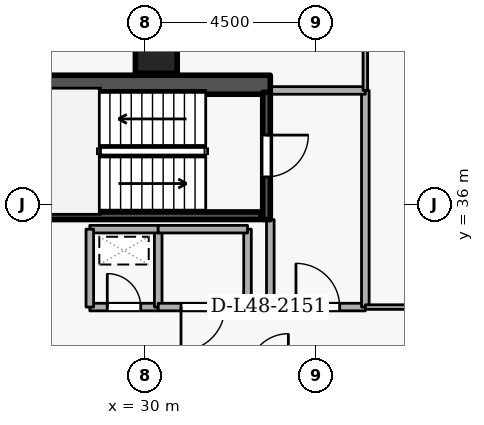
"""IFC4 building model, lengths in metres.
Left out: names, types, materials, properties, quantities, classifications, styles, units other than length and angle.
Written with IfcOpenShell. Run it as: python <this file> out.ifc"""

import sys

from ifc_helpers import new_model, si_unit, direction, frame, frame_2d, origin, origin_2d, place, context, subcontext, project, spatial, rectangle, extrude, element, fill, save


model = new_model("IFC4")
c1 = context("Model", 3, precision=1e-05, world=origin(), true_north=direction((0.0, 1.0)))
c2 = subcontext(c1, "Body", "Model", "MODEL_VIEW")
j1 = project(units=[si_unit("LENGTHUNIT", "METRE"), si_unit("PLANEANGLEUNIT", "RADIAN")], contexts=[c1])
p1 = place(None, origin())
s1 = spatial("IfcSite", under=j1, at=p1, CompositionType="ELEMENT")
p2 = place(p1, origin())
s2 = spatial("IfcBuilding", under=s1, at=p2, CompositionType="ELEMENT")
p3 = place(p2, frame((0.0, 0.0, 182.1)))
s3 = spatial("IfcBuildingStorey", under=s2, at=p3, CompositionType="ELEMENT", Elevation=182.1)
p4 = place(p3, frame((17.7, 39.15, 0.0), z_axis=(0.0, 0.0, 1.0), x_axis=(1.0, 0.0, 0.0)))
e1 = element("IfcWall", 1, at=p4, inside=s3, PredefinedType="SHEAR", context=c2, shape_type="SweptSolid", body=[
    extrude(rectangle(XDim=15.6, YDim=0.5, at=frame_2d((7.8, 0.0))), origin(), (0.0, 0.0, 1.0), 3.6),
])
p5 = place(p3, frame((30.3, 40.0, 0.0), z_axis=(0.0, 0.0, 1.0), x_axis=(1.0, 0.0, 0.0)))
e2 = element("IfcColumn", 2, at=p5, inside=s3, PredefinedType="COLUMN", context=c2, shape_type="SweptSolid", body=[
    extrude(rectangle(XDim=1.1, YDim=1.1, at=origin_2d()), origin(), (0.0, 0.0, 1.0), 3.6),
])
p6 = place(p3, frame((33.2, 38.95, 0.0), z_axis=(0.0, 0.0, 1.0), x_axis=(0.0, -1.0, 0.0)))
e3 = element("IfcWall", 3, at=p6, inside=s3, PredefinedType="SHEAR", context=c2, shape_type="SweptSolid", body=[
    extrude(rectangle(XDim=3.35, YDim=0.2, at=frame_2d((1.675, 0.0))), origin(), (0.0, 0.0, 1.0), 3.6),
])
p7 = place(p6, frame((1.125, 0.0, 0.0)))
e4 = element("IfcOpeningElement", 4, at=p7, cuts=e3, PredefinedType="OPENING", context=c2, shape_type="SweptSolid", body=[
    extrude(rectangle(XDim=1.1, YDim=2.1, at=frame_2d((0.55, 1.05))), frame((0.0, 0.11, 0.0), z_axis=(0.0, -1.0, 0.0), x_axis=(1.0, 0.0, 0.0)), (0.0, 0.0, 1.0), 0.22),
])
p8 = place(p3, frame((25.95, 35.703, 0.0), z_axis=(0.0, 0.0, 1.0), x_axis=(1.0, 0.0, 0.0)))
e5 = element("IfcWall", 5, at=p8, inside=s3, PredefinedType="SHEAR", context=c2, shape_type="SweptSolid", body=[
    extrude(rectangle(XDim=7.1, YDim=0.2, at=frame_2d((3.55, 0.0))), origin(), (0.0, 0.0, 1.0), 3.6),
])
p9 = place(p3, frame((33.3, 33.3, 0.0), z_axis=(0.0, 0.0, 1.0), x_axis=(1.0, 0.0, 0.0)))
e6 = element("IfcWall", 6, at=p9, inside=s3, PredefinedType="STANDARD", context=c2, shape_type="SweptSolid", body=[
    extrude(rectangle(XDim=2.5, YDim=0.2, at=frame_2d((1.25, 0.0))), origin(), (0.0, 0.0, 1.0), 3.34),
])
p10 = place(p9, frame((0.675, 0.0, 0.0)))
e7 = element("IfcOpeningElement", 7, at=p10, cuts=e6, PredefinedType="OPENING", context=c2, shape_type="SweptSolid", body=[
    extrude(rectangle(XDim=1.15, YDim=2.1, at=frame_2d((0.575, 1.05))), frame((0.0, 0.11, 0.0), z_axis=(0.0, -1.0, 0.0), x_axis=(1.0, 0.0, 0.0)), (0.0, 0.0, 1.0), 0.22),
])
p11 = place(p3, frame((35.8, 33.3, 0.0), z_axis=(0.0, 0.0, 1.0), x_axis=(0.0, 1.0, 0.0)))
e8 = element("IfcWall", 8, at=p11, inside=s3, PredefinedType="STANDARD", context=c2, shape_type="SweptSolid", body=[
    extrude(rectangle(XDim=5.7, YDim=0.2, at=frame_2d((2.85, 0.0))), origin(), (0.0, 0.0, 1.0), 3.34),
])
p12 = place(p3, frame((35.8, 39.0, 0.0), z_axis=(0.0, 0.0, 1.0), x_axis=(-1.0, 0.0, 0.0)))
e9 = element("IfcWall", 9, at=p12, inside=s3, PredefinedType="STANDARD", context=c2, shape_type="SweptSolid", body=[
    extrude(rectangle(XDim=2.5, YDim=0.2, at=frame_2d((1.25, 0.0))), origin(), (0.0, 0.0, 1.0), 3.34),
])
p13 = place(p3, frame((33.3, 35.6, 0.0), z_axis=(0.0, 0.0, 1.0), x_axis=(0.0, -1.0, 0.0)))
e10 = element("IfcWall", 10, at=p13, inside=s3, PredefinedType="STANDARD", context=c2, shape_type="SweptSolid", body=[
    extrude(rectangle(XDim=2.3, YDim=0.2, at=frame_2d((1.15, 0.0))), origin(), (0.0, 0.0, 1.0), 2.545),
])
p14 = place(p3, frame((28.55, 33.3, 0.0), z_axis=(0.0, 0.0, 1.0), x_axis=(1.0, 0.0, 0.0)))
e11 = element("IfcWall", 11, at=p14, inside=s3, PredefinedType="STANDARD", context=c2, shape_type="SweptSolid", body=[
    extrude(rectangle(XDim=1.8, YDim=0.2, at=frame_2d((0.9, 0.0))), origin(), (0.0, 0.0, 1.0), 3.34),
])
p15 = place(p14, frame((0.46, 0.0, 0.0)))
e12 = element("IfcOpeningElement", 12, at=p15, cuts=e11, PredefinedType="OPENING", context=c2, shape_type="SweptSolid", body=[
    extrude(rectangle(XDim=0.88, YDim=2.04, at=frame_2d((0.44, 1.02))), frame((0.0, 0.11, 0.0), z_axis=(0.0, -1.0, 0.0), x_axis=(1.0, 0.0, 0.0)), (0.0, 0.0, 1.0), 0.22),
])
p16 = place(p3, frame((30.35, 33.3, 0.0), z_axis=(0.0, 0.0, 1.0), x_axis=(0.0, 1.0, 0.0)))
e13 = element("IfcWall", 13, at=p16, inside=s3, PredefinedType="STANDARD", context=c2, shape_type="SweptSolid", body=[
    extrude(rectangle(XDim=2.05, YDim=0.2, at=frame_2d((1.025, 0.0))), origin(), (0.0, 0.0, 1.0), 3.34),
])
p17 = place(p3, frame((30.35, 35.35, 0.0), z_axis=(0.0, 0.0, 1.0), x_axis=(-1.0, 0.0, 0.0)))
e14 = element("IfcWall", 14, at=p17, inside=s3, PredefinedType="STANDARD", context=c2, shape_type="SweptSolid", body=[
    extrude(rectangle(XDim=1.8, YDim=0.2, at=frame_2d((0.9, 0.0))), origin(), (0.0, 0.0, 1.0), 3.34),
])
p18 = place(p3, frame((28.55, 35.35, 0.0), z_axis=(0.0, 0.0, 1.0), x_axis=(0.0, -1.0, 0.0)))
e15 = element("IfcWall", 15, at=p18, inside=s3, PredefinedType="STANDARD", context=c2, shape_type="SweptSolid", body=[
    extrude(rectangle(XDim=2.05, YDim=0.2, at=frame_2d((1.025, 0.0))), origin(), (0.0, 0.0, 1.0), 3.34),
])
p19 = place(p3, frame((32.7, 35.35, 0.0), z_axis=(0.0, 0.0, 1.0), x_axis=(0.0, -1.0, 0.0)))
e16 = element("IfcWall", 16, at=p19, inside=s3, PredefinedType="STANDARD", context=c2, shape_type="SweptSolid", body=[
    extrude(rectangle(XDim=2.05, YDim=0.2, at=frame_2d((1.025, 0.0))), origin(), (0.0, 0.0, 1.0), 2.545),
])
p20 = place(p3, frame((32.7, 33.3, 0.0), z_axis=(0.0, 0.0, 1.0), x_axis=(-1.0, 0.0, 0.0)))
e17 = element("IfcWall", 17, at=p20, inside=s3, PredefinedType="STANDARD", context=c2, shape_type="SweptSolid", body=[
    extrude(rectangle(XDim=2.35, YDim=0.2, at=frame_2d((1.175, 0.0))), origin(), (0.0, 0.0, 1.0), 3.34),
])
p21 = place(p20, frame((0.6, 0.0, 0.0)))
e18 = element("IfcOpeningElement", 18, at=p21, cuts=e17, PredefinedType="OPENING", context=c2, shape_type="SweptSolid", body=[
    extrude(rectangle(XDim=1.15, YDim=2.1, at=frame_2d((0.575, 1.05))), frame((0.0, 0.11, 0.0), z_axis=(0.0, -1.0, 0.0), x_axis=(1.0, 0.0, 0.0)), (0.0, 0.0, 1.0), 0.22),
])
p22 = place(p3, frame((30.35, 35.35, 0.0), z_axis=(0.0, 0.0, 1.0), x_axis=(1.0, 0.0, 0.0)))
e19 = element("IfcWall", 19, at=p22, inside=s3, PredefinedType="STANDARD", context=c2, shape_type="SweptSolid", body=[
    extrude(rectangle(XDim=2.35, YDim=0.2, at=frame_2d((1.175, 0.0))), origin(), (0.0, 0.0, 1.0), 3.34),
])
p23 = place(p3, frame((37.75, 33.3, 0.0), z_axis=(0.0, 0.0, 1.0), x_axis=(-1.0, 0.0, 0.0)))
e20 = element("IfcWall", 20, at=p23, inside=s3, PredefinedType="PARTITIONING", context=c2, shape_type="SweptSolid", body=[
    extrude(rectangle(XDim=1.95, YDim=0.12, at=frame_2d((0.975, 0.0))), origin(), (0.0, 0.0, 1.0), 3.34),
])
p24 = place(p3, frame((35.8, 39.0, 0.0), z_axis=(0.0, 0.0, 1.0), x_axis=(0.0, 1.0, 0.0)))
e21 = element("IfcWall", 21, at=p24, inside=s3, PredefinedType="PARTITIONING", context=c2, shape_type="SweptSolid", body=[
    extrude(rectangle(XDim=11.72, YDim=0.12, at=frame_2d((5.86, 0.0))), origin(), (0.0, 0.0, 1.0), 3.34),
])
p25 = place(p7, origin())
e22 = element("IfcDoor", 22, at=p25, inside=s3, OperationType="SINGLE_SWING_LEFT", PredefinedType="DOOR", context=c2, shape_type="SweptSolid", body=[
    extrude(rectangle(XDim=1.1, YDim=2.1, at=frame_2d((0.55, 1.05))), frame((0.0, 0.025, 0.0), z_axis=(0.0, -1.0, 0.0), x_axis=(1.0, 0.0, 0.0)), (0.0, 0.0, 1.0), 0.05),
])
fill(e4, e22)
p26 = place(p10, origin())
e23 = element("IfcDoor", 23, at=p26, inside=s3, OperationType="SINGLE_SWING_LEFT", PredefinedType="DOOR", context=c2, shape_type="SweptSolid", body=[
    extrude(rectangle(XDim=1.15, YDim=2.1, at=frame_2d((0.575, 1.05))), frame((0.0, 0.025, 0.0), z_axis=(0.0, -1.0, 0.0), x_axis=(1.0, 0.0, 0.0)), (0.0, 0.0, 1.0), 0.05),
])
fill(e7, e23)
p27 = place(p15, origin())
e24 = element("IfcDoor", 24, at=p27, inside=s3, OperationType="SINGLE_SWING_LEFT", PredefinedType="DOOR", context=c2, shape_type="SweptSolid", body=[
    extrude(rectangle(XDim=0.88, YDim=2.04, at=frame_2d((0.44, 1.02))), frame((0.0, 0.025, 0.0), z_axis=(0.0, -1.0, 0.0), x_axis=(1.0, 0.0, 0.0)), (0.0, 0.0, 1.0), 0.05),
])
fill(e12, e24)
p28 = place(p21, origin())
e25 = element("IfcDoor", 25, at=p28, inside=s3, OperationType="SINGLE_SWING_RIGHT", PredefinedType="DOOR", context=c2, shape_type="SweptSolid", body=[
    extrude(rectangle(XDim=1.15, YDim=2.1, at=frame_2d((0.575, 1.05))), frame((0.0, 0.025, 0.0), z_axis=(0.0, -1.0, 0.0), x_axis=(1.0, 0.0, 0.0)), (0.0, 0.0, 1.0), 0.05),
])
fill(e18, e25)
save(model, sys.argv[1])
